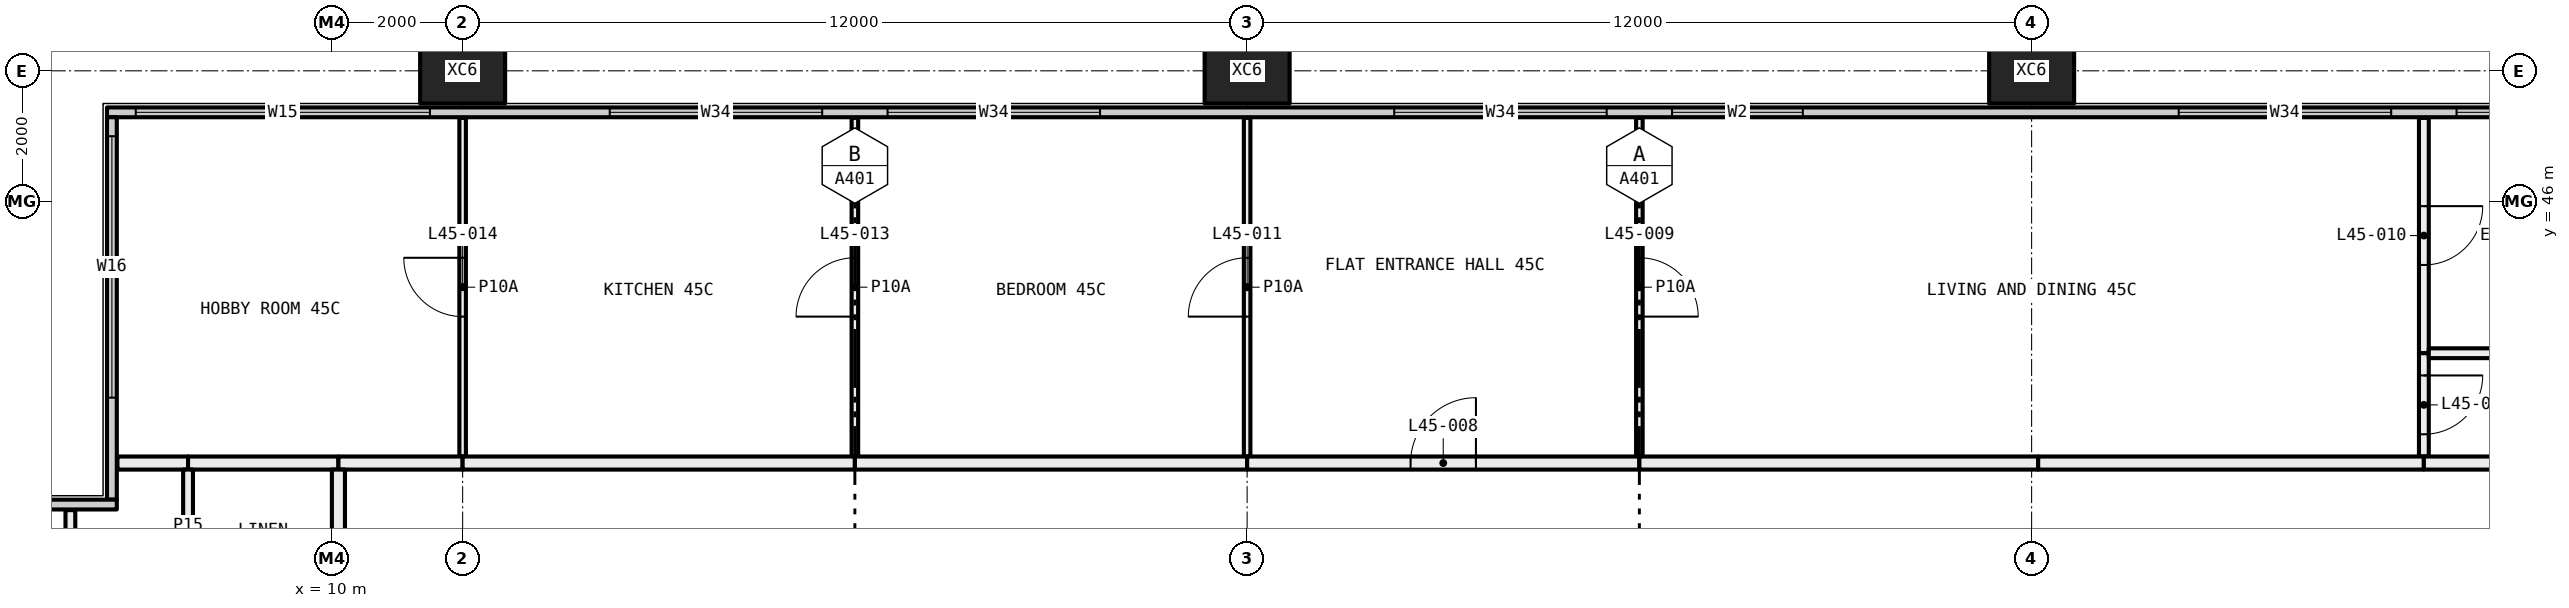
"""IFC4 building model, lengths in metres.
Left out: names, types, materials, properties, quantities, classifications, styles, units other than length and angle.
Written with IfcOpenShell. Run it as: python <this file> out.ifc"""

import sys

from ifc_helpers import new_model, si_unit, direction, frame, frame_2d, origin, origin_2d, place, context, subcontext, project, spatial, rectangle, hollow_rectangle, extrude, element, fill, save


model = new_model("IFC4")
c1 = context("Model", 3, precision=1e-05, world=origin(), true_north=direction((0.0, 1.0)))
c2 = subcontext(c1, "Body", "Model", "MODEL_VIEW")
j1 = project(units=[si_unit("LENGTHUNIT", "METRE"), si_unit("PLANEANGLEUNIT", "RADIAN")], contexts=[c1])
p1 = place(None, origin())
s1 = spatial("IfcSite", under=j1, at=p1, CompositionType="ELEMENT")
p2 = place(p1, origin())
s2 = spatial("IfcBuilding", under=s1, at=p2, CompositionType="ELEMENT")
p3 = place(p2, frame((0.0, 0.0, 172.05)))
s3 = spatial("IfcBuildingStorey", under=s2, at=p3, CompositionType="ELEMENT", Elevation=172.05)
for number, where, z_axis, x_axis in (
    (1, (12.0, 48.0, -0.4), (0.0, 0.0, 1.0), (1.0, 0.0, 0.0)),
    (2, (24.0, 48.0, -0.4), (0.0, 0.0, 1.0), (1.0, 0.0, 0.0)),
    (3, (36.0, 48.0, -0.4), (0.0, 0.0, 1.0), (1.0, 0.0, 0.0)),
):
    element("IfcColumn", number, at=place(p3, frame(where, z_axis=z_axis, x_axis=x_axis)), inside=s3, PredefinedType="COLUMN", context=c2, shape_type="SweptSolid", body=[
        extrude(hollow_rectangle(XDim=1.3, YDim=1.0, WallThickness=0.05, at=origin_2d()), origin(), (0.0, 0.0, 1.0), 3.45),
    ])
p4 = place(p3, frame((6.56, 47.365, 0.0), z_axis=(0.0, 0.0, 1.0), x_axis=(1.0, 0.0, 0.0)))
e4 = element("IfcWall", 4, at=p4, inside=s3, PredefinedType="ELEMENTEDWALL", context=c2, shape_type="SweptSolid", body=[
    extrude(rectangle(XDim=46.88, YDim=0.15, at=frame_2d((23.44, 0.0))), origin(), (0.0, 0.0, 1.0), 3.05),
])
p5 = place(p4, frame((0.44, 0.0, 0.45)))
e5 = element("IfcOpeningElement", 5, at=p5, cuts=e4, PredefinedType="OPENING", context=c2, shape_type="SweptSolid", body=[
    extrude(rectangle(XDim=4.5, YDim=2.55, at=frame_2d((2.25, 1.275))), frame((0.0, 0.085, 0.0), z_axis=(0.0, -1.0, 0.0), x_axis=(1.0, 0.0, 0.0)), (0.0, 0.0, 1.0), 0.17),
])
p6 = place(p4, frame((7.69, 0.0, 0.45)))
e6 = element("IfcOpeningElement", 6, at=p6, cuts=e4, PredefinedType="OPENING", context=c2, shape_type="SweptSolid", body=[
    extrude(rectangle(XDim=3.25, YDim=2.55, at=frame_2d((1.625, 1.275))), frame((0.0, 0.085, 0.0), z_axis=(0.0, -1.0, 0.0), x_axis=(1.0, 0.0, 0.0)), (0.0, 0.0, 1.0), 0.17),
])
p7 = place(p4, frame((11.94, 0.0, 0.45)))
e7 = element("IfcOpeningElement", 7, at=p7, cuts=e4, PredefinedType="OPENING", context=c2, shape_type="SweptSolid", body=[
    extrude(rectangle(XDim=3.25, YDim=2.55, at=frame_2d((1.625, 1.275))), frame((0.0, 0.085, 0.0), z_axis=(0.0, -1.0, 0.0), x_axis=(1.0, 0.0, 0.0)), (0.0, 0.0, 1.0), 0.17),
])
p8 = place(p4, frame((19.69, 0.0, 0.45)))
e8 = element("IfcOpeningElement", 8, at=p8, cuts=e4, PredefinedType="OPENING", context=c2, shape_type="SweptSolid", body=[
    extrude(rectangle(XDim=3.25, YDim=2.55, at=frame_2d((1.625, 1.275))), frame((0.0, 0.085, 0.0), z_axis=(0.0, -1.0, 0.0), x_axis=(1.0, 0.0, 0.0)), (0.0, 0.0, 1.0), 0.17),
])
p9 = place(p4, frame((23.94, 0.0, 0.45)))
e9 = element("IfcOpeningElement", 9, at=p9, cuts=e4, PredefinedType="OPENING", context=c2, shape_type="SweptSolid", body=[
    extrude(rectangle(XDim=2.0, YDim=2.55, at=frame_2d((1.0, 1.275))), frame((0.0, 0.085, 0.0), z_axis=(0.0, -1.0, 0.0), x_axis=(1.0, 0.0, 0.0)), (0.0, 0.0, 1.0), 0.17),
])
p10 = place(p4, frame((31.69, 0.0, 0.45)))
e10 = element("IfcOpeningElement", 10, at=p10, cuts=e4, PredefinedType="OPENING", context=c2, shape_type="SweptSolid", body=[
    extrude(rectangle(XDim=3.25, YDim=2.55, at=frame_2d((1.625, 1.275))), frame((0.0, 0.085, 0.0), z_axis=(0.0, -1.0, 0.0), x_axis=(1.0, 0.0, 0.0)), (0.0, 0.0, 1.0), 0.17),
])
p11 = place(p4, frame((35.94, 0.0, 0.45)))
e11 = element("IfcOpeningElement", 11, at=p11, cuts=e4, PredefinedType="OPENING", context=c2, shape_type="SweptSolid", body=[
    extrude(rectangle(XDim=3.25, YDim=2.55, at=frame_2d((1.625, 1.275))), frame((0.0, 0.085, 0.0), z_axis=(0.0, -1.0, 0.0), x_axis=(1.0, 0.0, 0.0)), (0.0, 0.0, 1.0), 0.17),
])
p12 = place(p4, frame((41.94, 0.0, 0.45)))
e12 = element("IfcOpeningElement", 12, at=p12, cuts=e4, PredefinedType="OPENING", context=c2, shape_type="SweptSolid", body=[
    extrude(rectangle(XDim=4.5, YDim=2.55, at=frame_2d((2.25, 1.275))), frame((0.0, 0.085, 0.0), z_axis=(0.0, -1.0, 0.0), x_axis=(1.0, 0.0, 0.0)), (0.0, 0.0, 1.0), 0.17),
])
p13 = place(p3, frame((6.635, 41.44, 0.0), z_axis=(0.0, 0.0, 1.0), x_axis=(0.0, 1.0, 0.0)))
e13 = element("IfcWall", 13, at=p13, inside=s3, PredefinedType="ELEMENTEDWALL", context=c2, shape_type="SweptSolid", body=[
    extrude(rectangle(XDim=5.85, YDim=0.15, at=frame_2d((2.925, 0.0))), origin(), (0.0, 0.0, 1.0), 3.05),
])
p14 = place(p13, frame((1.56, 0.0, 0.45)))
e14 = element("IfcOpeningElement", 14, at=p14, cuts=e13, PredefinedType="OPENING", context=c2, shape_type="SweptSolid", body=[
    extrude(rectangle(XDim=4.0, YDim=2.55, at=frame_2d((2.0, 1.275))), frame((0.0, 0.085, 0.0), z_axis=(0.0, -1.0, 0.0), x_axis=(1.0, 0.0, 0.0)), (0.0, 0.0, 1.0), 0.17),
])
p15 = place(p3, frame((0.56, 41.365, 0.0), z_axis=(0.0, 0.0, 1.0), x_axis=(1.0, 0.0, 0.0)))
e15 = element("IfcWall", 15, at=p15, inside=s3, PredefinedType="ELEMENTEDWALL", context=c2, shape_type="SweptSolid", body=[
    extrude(rectangle(XDim=6.15, YDim=0.15, at=frame_2d((3.075, 0.0))), origin(), (0.0, 0.0, 1.0), 3.05),
])
p16 = place(p15, frame((0.44, 0.0, 0.45)))
e16 = element("IfcOpeningElement", 16, at=p16, cuts=e15, PredefinedType="OPENING", context=c2, shape_type="SweptSolid", body=[
    extrude(rectangle(XDim=4.0, YDim=2.55, at=frame_2d((2.0, 1.275))), frame((0.0, 0.085, 0.0), z_axis=(0.0, -1.0, 0.0), x_axis=(1.0, 0.0, 0.0)), (0.0, 0.0, 1.0), 0.17),
])
p17 = place(p3, frame((12.0, 42.1, 0.0), z_axis=(0.0, 0.0, 1.0), x_axis=(0.0, 1.0, 0.0)))
e17 = element("IfcWall", 17, at=p17, inside=s3, PredefinedType="PARTITIONING", context=c2, shape_type="SweptSolid", body=[
    extrude(rectangle(XDim=5.18, YDim=0.1, at=frame_2d((2.59, 0.0))), origin(), (0.0, 0.0, 1.0), 3.05),
])
p18 = place(p17, frame((2.14, 0.0, 0.0)))
e18 = element("IfcOpeningElement", 18, at=p18, cuts=e17, PredefinedType="OPENING", context=c2, shape_type="SweptSolid", body=[
    extrude(rectangle(XDim=0.9, YDim=2.1, at=frame_2d((0.45, 1.05))), frame((0.0, 0.06, 0.0), z_axis=(0.0, -1.0, 0.0), x_axis=(1.0, 0.0, 0.0)), (0.0, 0.0, 1.0), 0.12),
])
p19 = place(p3, frame((6.72, 42.0, 0.0), z_axis=(0.0, 0.0, 1.0), x_axis=(1.0, 0.0, 0.0)))
e19 = element("IfcWall", 19, at=p19, inside=s3, PredefinedType="PARTITIONING", context=c2, shape_type="SweptSolid", body=[
    extrude(rectangle(XDim=1.08, YDim=0.2, at=frame_2d((0.54, 0.0))), origin(), (0.0, 0.0, 1.0), 3.05),
])
p20 = place(p3, frame((7.8, 42.0, 0.0), z_axis=(0.0, 0.0, 1.0), x_axis=(1.0, 0.0, 0.0)))
e20 = element("IfcWall", 20, at=p20, inside=s3, PredefinedType="PARTITIONING", context=c2, shape_type="SweptSolid", body=[
    extrude(rectangle(XDim=2.3, YDim=0.2, at=frame_2d((1.15, 0.0))), origin(), (0.0, 0.0, 1.0), 3.05),
])
p21 = place(p3, frame((10.1, 42.0, 0.0), z_axis=(0.0, 0.0, 1.0), x_axis=(1.0, 0.0, 0.0)))
e21 = element("IfcWall", 21, at=p21, inside=s3, PredefinedType="PARTITIONING", context=c2, shape_type="SweptSolid", body=[
    extrude(rectangle(XDim=1.9, YDim=0.2, at=frame_2d((0.95, 0.0))), origin(), (0.0, 0.0, 1.0), 3.05),
])
p22 = place(p3, frame((18.0, 42.1, 0.0), z_axis=(0.0, 0.0, 1.0), x_axis=(0.0, 1.0, 0.0)))
e22 = element("IfcWall", 22, at=p22, inside=s3, PredefinedType="PARTITIONING", context=c2, shape_type="SweptSolid", body=[
    extrude(rectangle(XDim=5.18, YDim=0.1, at=frame_2d((2.59, 0.0))), origin(), (0.0, 0.0, 1.0), 3.05),
])
p23 = place(p22, frame((2.14, 0.0, 0.0)))
e23 = element("IfcOpeningElement", 23, at=p23, cuts=e22, PredefinedType="OPENING", context=c2, shape_type="SweptSolid", body=[
    extrude(rectangle(XDim=0.9, YDim=2.1, at=frame_2d((0.45, 1.05))), frame((0.0, 0.06, 0.0), z_axis=(0.0, -1.0, 0.0), x_axis=(1.0, 0.0, 0.0)), (0.0, 0.0, 1.0), 0.12),
])
p24 = place(p3, frame((12.0, 42.0, 0.0), z_axis=(0.0, 0.0, 1.0), x_axis=(1.0, 0.0, 0.0)))
e24 = element("IfcWall", 24, at=p24, inside=s3, PredefinedType="PARTITIONING", context=c2, shape_type="SweptSolid", body=[
    extrude(rectangle(XDim=6.0, YDim=0.2, at=frame_2d((3.0, 0.0))), origin(), (0.0, 0.0, 1.0), 3.05),
])
p25 = place(p3, frame((24.0, 42.1, 0.0), z_axis=(0.0, 0.0, 1.0), x_axis=(0.0, 1.0, 0.0)))
e25 = element("IfcWall", 25, at=p25, inside=s3, PredefinedType="PARTITIONING", context=c2, shape_type="SweptSolid", body=[
    extrude(rectangle(XDim=5.18, YDim=0.1, at=frame_2d((2.59, 0.0))), origin(), (0.0, 0.0, 1.0), 3.05),
])
p26 = place(p25, frame((2.14, 0.0, 0.0)))
e26 = element("IfcOpeningElement", 26, at=p26, cuts=e25, PredefinedType="OPENING", context=c2, shape_type="SweptSolid", body=[
    extrude(rectangle(XDim=0.9, YDim=2.1, at=frame_2d((0.45, 1.05))), frame((0.0, 0.06, 0.0), z_axis=(0.0, -1.0, 0.0), x_axis=(1.0, 0.0, 0.0)), (0.0, 0.0, 1.0), 0.12),
])
p27 = place(p3, frame((18.0, 42.0, 0.0), z_axis=(0.0, 0.0, 1.0), x_axis=(1.0, 0.0, 0.0)))
e27 = element("IfcWall", 27, at=p27, inside=s3, PredefinedType="PARTITIONING", context=c2, shape_type="SweptSolid", body=[
    extrude(rectangle(XDim=6.0, YDim=0.2, at=frame_2d((3.0, 0.0))), origin(), (0.0, 0.0, 1.0), 3.05),
])
p28 = place(p3, frame((30.0, 42.1, 0.0), z_axis=(0.0, 0.0, 1.0), x_axis=(0.0, 1.0, 0.0)))
e28 = element("IfcWall", 28, at=p28, inside=s3, PredefinedType="PARTITIONING", context=c2, shape_type="SweptSolid", body=[
    extrude(rectangle(XDim=5.18, YDim=0.1, at=frame_2d((2.59, 0.0))), origin(), (0.0, 0.0, 1.0), 3.05),
])
p29 = place(p28, frame((2.14, 0.0, 0.0)))
e29 = element("IfcOpeningElement", 29, at=p29, cuts=e28, PredefinedType="OPENING", context=c2, shape_type="SweptSolid", body=[
    extrude(rectangle(XDim=0.9, YDim=2.1, at=frame_2d((0.45, 1.05))), frame((0.0, 0.06, 0.0), z_axis=(0.0, -1.0, 0.0), x_axis=(1.0, 0.0, 0.0)), (0.0, 0.0, 1.0), 0.12),
])
p30 = place(p3, frame((24.0, 42.0, 0.0), z_axis=(0.0, 0.0, 1.0), x_axis=(1.0, 0.0, 0.0)))
e30 = element("IfcWall", 30, at=p30, inside=s3, PredefinedType="PARTITIONING", context=c2, shape_type="SweptSolid", body=[
    extrude(rectangle(XDim=6.0, YDim=0.2, at=frame_2d((3.0, 0.0))), origin(), (0.0, 0.0, 1.0), 3.05),
])
p31 = place(p30, frame((2.5, 0.0, 0.0)))
e31 = element("IfcOpeningElement", 31, at=p31, cuts=e30, PredefinedType="OPENING", context=c2, shape_type="SweptSolid", body=[
    extrude(rectangle(XDim=1.0, YDim=2.1, at=frame_2d((0.5, 1.05))), frame((0.0, 0.11, 0.0), z_axis=(0.0, -1.0, 0.0), x_axis=(1.0, 0.0, 0.0)), (0.0, 0.0, 1.0), 0.22),
])
p32 = place(p3, frame((42.0, 43.68, 0.0), z_axis=(0.0, 0.0, 1.0), x_axis=(0.0, 1.0, 0.0)))
e32 = element("IfcWall", 32, at=p32, inside=s3, PredefinedType="PARTITIONING", context=c2, shape_type="SweptSolid", body=[
    extrude(rectangle(XDim=3.6, YDim=0.15, at=frame_2d((1.8, 0.0))), origin(), (0.0, 0.0, 1.0), 3.05),
])
p33 = place(p32, frame((1.35, 0.0, 0.0)))
e33 = element("IfcOpeningElement", 33, at=p33, cuts=e32, PredefinedType="OPENING", context=c2, shape_type="SweptSolid", body=[
    extrude(rectangle(XDim=0.9, YDim=2.1, at=frame_2d((0.45, 1.05))), frame((0.0, 0.085, 0.0), z_axis=(0.0, -1.0, 0.0), x_axis=(1.0, 0.0, 0.0)), (0.0, 0.0, 1.0), 0.17),
])
p34 = place(p3, frame((42.0, 42.1, 0.0), z_axis=(0.0, 0.0, 1.0), x_axis=(0.0, 1.0, 0.0)))
e34 = element("IfcWall", 34, at=p34, inside=s3, PredefinedType="PARTITIONING", context=c2, shape_type="SweptSolid", body=[
    extrude(rectangle(XDim=1.58, YDim=0.15, at=frame_2d((0.79, 0.0))), origin(), (0.0, 0.0, 1.0), 3.05),
])
p35 = place(p34, frame((0.34, 0.0, 0.0)))
e35 = element("IfcOpeningElement", 35, at=p35, cuts=e34, PredefinedType="OPENING", context=c2, shape_type="SweptSolid", body=[
    extrude(rectangle(XDim=0.9, YDim=2.1, at=frame_2d((0.45, 1.05))), frame((0.0, 0.085, 0.0), z_axis=(0.0, -1.0, 0.0), x_axis=(1.0, 0.0, 0.0)), (0.0, 0.0, 1.0), 0.17),
])
p36 = place(p3, frame((30.0, 42.0, 0.0), z_axis=(0.0, 0.0, 1.0), x_axis=(1.0, 0.0, 0.0)))
e36 = element("IfcWall", 36, at=p36, inside=s3, PredefinedType="PARTITIONING", context=c2, shape_type="SweptSolid", body=[
    extrude(rectangle(XDim=6.1, YDim=0.2, at=frame_2d((3.05, 0.0))), origin(), (0.0, 0.0, 1.0), 2.45),
])
p37 = place(p3, frame((36.1, 42.0, 0.0), z_axis=(0.0, 0.0, 1.0), x_axis=(1.0, 0.0, 0.0)))
e37 = element("IfcWall", 37, at=p37, inside=s3, PredefinedType="PARTITIONING", context=c2, shape_type="SweptSolid", body=[
    extrude(rectangle(XDim=5.9, YDim=0.2, at=frame_2d((2.95, 0.0))), origin(), (0.0, 0.0, 1.0), 3.05),
])
p38 = place(p3, frame((42.075, 43.68, 0.0), z_axis=(0.0, 0.0, 1.0), x_axis=(1.0, 0.0, 0.0)))
e38 = element("IfcWall", 38, at=p38, inside=s3, PredefinedType="PARTITIONING", context=c2, shape_type="SweptSolid", body=[
    extrude(rectangle(XDim=5.825, YDim=0.15, at=frame_2d((2.913, 0.0))), origin(), (0.0, 0.0, 1.0), 3.05),
])
p39 = place(p3, frame((42.0, 42.0, 0.0), z_axis=(0.0, 0.0, 1.0), x_axis=(1.0, 0.0, 0.0)))
e39 = element("IfcWall", 39, at=p39, inside=s3, PredefinedType="PARTITIONING", context=c2, shape_type="SweptSolid", body=[
    extrude(rectangle(XDim=5.9, YDim=0.2, at=frame_2d((2.95, 0.0))), origin(), (0.0, 0.0, 1.0), 3.05),
])
p40 = place(p3, frame((6.0, 39.0, 0.0), z_axis=(0.0, 0.0, 1.0), x_axis=(0.0, 1.0, 0.0)))
e40 = element("IfcWall", 40, at=p40, inside=s3, PredefinedType="PARTITIONING", context=c2, shape_type="SweptSolid", body=[
    extrude(rectangle(XDim=2.28, YDim=0.15, at=frame_2d((1.14, 0.0))), origin(), (0.0, 0.0, 1.0), 3.05),
])
p41 = place(p3, frame((7.8, 39.075, 0.0), z_axis=(0.0, 0.0, 1.0), x_axis=(0.0, 1.0, 0.0)))
e41 = element("IfcWall", 41, at=p41, inside=s3, PredefinedType="PARTITIONING", context=c2, shape_type="SweptSolid", body=[
    extrude(rectangle(XDim=2.825, YDim=0.15, at=frame_2d((1.413, 0.0))), origin(), (0.0, 0.0, 1.0), 3.05),
])
p42 = place(p3, frame((10.1, 39.0, 0.0), z_axis=(0.0, 0.0, 1.0), x_axis=(0.0, 1.0, 0.0)))
e42 = element("IfcWall", 42, at=p42, inside=s3, PredefinedType="PARTITIONING", context=c2, shape_type="SweptSolid", body=[
    extrude(rectangle(XDim=2.9, YDim=0.2, at=frame_2d((1.45, 0.0))), origin(), (0.0, 0.0, 1.0), 3.05),
])
p43 = place(p5, origin())
e43 = element("IfcWindow", 43, at=p43, inside=s3, PartitioningType="SINGLE_PANEL", PredefinedType="WINDOW", context=c2, shape_type="SweptSolid", body=[
    extrude(rectangle(XDim=4.5, YDim=2.55, at=frame_2d((2.25, 1.275))), frame((0.0, 0.03, 0.0), z_axis=(0.0, -1.0, 0.0), x_axis=(1.0, 0.0, 0.0)), (0.0, 0.0, 1.0), 0.06),
])
fill(e5, e43)
p44 = place(p6, origin())
e44 = element("IfcWindow", 44, at=p44, inside=s3, PartitioningType="SINGLE_PANEL", PredefinedType="WINDOW", context=c2, shape_type="SweptSolid", body=[
    extrude(rectangle(XDim=3.25, YDim=2.55, at=frame_2d((1.625, 1.275))), frame((0.0, 0.03, 0.0), z_axis=(0.0, -1.0, 0.0), x_axis=(1.0, 0.0, 0.0)), (0.0, 0.0, 1.0), 0.06),
])
fill(e6, e44)
p45 = place(p7, origin())
e45 = element("IfcWindow", 45, at=p45, inside=s3, PartitioningType="SINGLE_PANEL", PredefinedType="WINDOW", context=c2, shape_type="SweptSolid", body=[
    extrude(rectangle(XDim=3.25, YDim=2.55, at=frame_2d((1.625, 1.275))), frame((0.0, 0.03, 0.0), z_axis=(0.0, -1.0, 0.0), x_axis=(1.0, 0.0, 0.0)), (0.0, 0.0, 1.0), 0.06),
])
fill(e7, e45)
p46 = place(p8, origin())
e46 = element("IfcWindow", 46, at=p46, inside=s3, PartitioningType="SINGLE_PANEL", PredefinedType="WINDOW", context=c2, shape_type="SweptSolid", body=[
    extrude(rectangle(XDim=3.25, YDim=2.55, at=frame_2d((1.625, 1.275))), frame((0.0, 0.03, 0.0), z_axis=(0.0, -1.0, 0.0), x_axis=(1.0, 0.0, 0.0)), (0.0, 0.0, 1.0), 0.06),
])
fill(e8, e46)
p47 = place(p9, origin())
e47 = element("IfcWindow", 47, at=p47, inside=s3, PartitioningType="SINGLE_PANEL", PredefinedType="WINDOW", context=c2, shape_type="SweptSolid", body=[
    extrude(rectangle(XDim=2.0, YDim=2.55, at=frame_2d((1.0, 1.275))), frame((0.0, 0.03, 0.0), z_axis=(0.0, -1.0, 0.0), x_axis=(1.0, 0.0, 0.0)), (0.0, 0.0, 1.0), 0.06),
])
fill(e9, e47)
p48 = place(p10, origin())
e48 = element("IfcWindow", 48, at=p48, inside=s3, PartitioningType="SINGLE_PANEL", PredefinedType="WINDOW", context=c2, shape_type="SweptSolid", body=[
    extrude(rectangle(XDim=3.25, YDim=2.55, at=frame_2d((1.625, 1.275))), frame((0.0, 0.03, 0.0), z_axis=(0.0, -1.0, 0.0), x_axis=(1.0, 0.0, 0.0)), (0.0, 0.0, 1.0), 0.06),
])
fill(e10, e48)
p49 = place(p11, origin())
e49 = element("IfcWindow", 49, at=p49, inside=s3, PartitioningType="SINGLE_PANEL", PredefinedType="WINDOW", context=c2, shape_type="SweptSolid", body=[
    extrude(rectangle(XDim=3.25, YDim=2.55, at=frame_2d((1.625, 1.275))), frame((0.0, 0.03, 0.0), z_axis=(0.0, -1.0, 0.0), x_axis=(1.0, 0.0, 0.0)), (0.0, 0.0, 1.0), 0.06),
])
fill(e11, e49)
p50 = place(p14, origin())
e50 = element("IfcWindow", 50, at=p50, inside=s3, PartitioningType="SINGLE_PANEL", PredefinedType="WINDOW", context=c2, shape_type="SweptSolid", body=[
    extrude(rectangle(XDim=4.0, YDim=2.55, at=frame_2d((2.0, 1.275))), frame((0.0, 0.03, 0.0), z_axis=(0.0, -1.0, 0.0), x_axis=(1.0, 0.0, 0.0)), (0.0, 0.0, 1.0), 0.06),
])
fill(e14, e50)
p51 = place(p31, origin())
e51 = element("IfcDoor", 51, at=p51, inside=s3, OperationType="SINGLE_SWING_LEFT", PredefinedType="DOOR", context=c2, shape_type="SweptSolid", body=[
    extrude(rectangle(XDim=1.0, YDim=2.1, at=frame_2d((0.5, 1.05))), frame((0.0, 0.025, 0.0), z_axis=(0.0, -1.0, 0.0), x_axis=(1.0, 0.0, 0.0)), (0.0, 0.0, 1.0), 0.05),
])
fill(e31, e51)
p52 = place(p29, frame((0.9, 0.0, 0.0), x_axis=(-1.0, 0.0, 0.0)))
e52 = element("IfcDoor", 52, at=p52, inside=s3, OperationType="SINGLE_SWING_LEFT", PredefinedType="DOOR", context=c2, shape_type="SweptSolid", body=[
    extrude(rectangle(XDim=0.9, YDim=2.1, at=frame_2d((0.45, 1.05))), frame((0.0, 0.025, 0.0), z_axis=(0.0, -1.0, 0.0), x_axis=(1.0, 0.0, 0.0)), (0.0, 0.0, 1.0), 0.05),
])
fill(e29, e52)
p53 = place(p33, frame((0.9, 0.0, 0.0), x_axis=(-1.0, 0.0, 0.0)))
e53 = element("IfcDoor", 53, at=p53, inside=s3, OperationType="SINGLE_SWING_RIGHT", PredefinedType="DOOR", context=c2, shape_type="SweptSolid", body=[
    extrude(rectangle(XDim=0.9, YDim=2.1, at=frame_2d((0.45, 1.05))), frame((0.0, 0.025, 0.0), z_axis=(0.0, -1.0, 0.0), x_axis=(1.0, 0.0, 0.0)), (0.0, 0.0, 1.0), 0.05),
])
fill(e33, e53)
p54 = place(p26, origin())
e54 = element("IfcDoor", 54, at=p54, inside=s3, OperationType="SINGLE_SWING_RIGHT", PredefinedType="DOOR", context=c2, shape_type="SweptSolid", body=[
    extrude(rectangle(XDim=0.9, YDim=2.1, at=frame_2d((0.45, 1.05))), frame((0.0, 0.025, 0.0), z_axis=(0.0, -1.0, 0.0), x_axis=(1.0, 0.0, 0.0)), (0.0, 0.0, 1.0), 0.05),
])
fill(e26, e54)
p55 = place(p35, frame((0.9, 0.0, 0.0), x_axis=(-1.0, 0.0, 0.0)))
e55 = element("IfcDoor", 55, at=p55, inside=s3, OperationType="SINGLE_SWING_RIGHT", PredefinedType="DOOR", context=c2, shape_type="SweptSolid", body=[
    extrude(rectangle(XDim=0.9, YDim=2.1, at=frame_2d((0.45, 1.05))), frame((0.0, 0.025, 0.0), z_axis=(0.0, -1.0, 0.0), x_axis=(1.0, 0.0, 0.0)), (0.0, 0.0, 1.0), 0.05),
])
fill(e35, e55)
p56 = place(p23, origin())
e56 = element("IfcDoor", 56, at=p56, inside=s3, OperationType="SINGLE_SWING_RIGHT", PredefinedType="DOOR", context=c2, shape_type="SweptSolid", body=[
    extrude(rectangle(XDim=0.9, YDim=2.1, at=frame_2d((0.45, 1.05))), frame((0.0, 0.025, 0.0), z_axis=(0.0, -1.0, 0.0), x_axis=(1.0, 0.0, 0.0)), (0.0, 0.0, 1.0), 0.05),
])
fill(e23, e56)
p57 = place(p18, origin())
e57 = element("IfcDoor", 57, at=p57, inside=s3, OperationType="SINGLE_SWING_LEFT", PredefinedType="DOOR", context=c2, shape_type="SweptSolid", body=[
    extrude(rectangle(XDim=0.9, YDim=2.1, at=frame_2d((0.45, 1.05))), frame((0.0, 0.025, 0.0), z_axis=(0.0, -1.0, 0.0), x_axis=(1.0, 0.0, 0.0)), (0.0, 0.0, 1.0), 0.05),
])
fill(e18, e57)
save(model, sys.argv[1])
